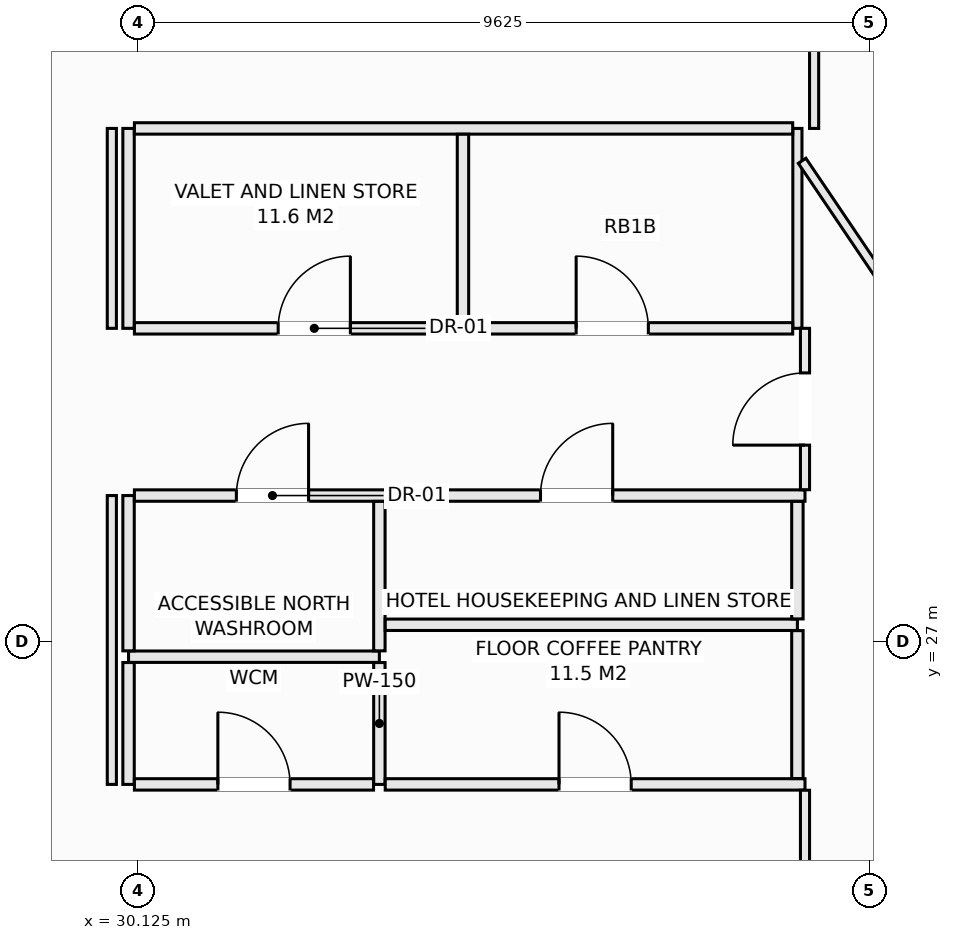
"""IFC4 building model, lengths in metres.
Left out: names, types, materials, properties, quantities, classifications, styles, units other than length and angle.
Written with IfcOpenShell. Run it as: python <this file> out.ifc"""

import sys

from ifc_helpers import new_model, si_unit, direction, frame, frame_2d, origin, place, context, subcontext, project, spatial, rectangle, extrude, element, fill, save


model = new_model("IFC4")
c1 = context("Model", 3, precision=1e-05, world=origin(), true_north=direction((0.0, 1.0)))
c2 = subcontext(c1, "Body", "Model", "MODEL_VIEW")
j1 = project(units=[si_unit("LENGTHUNIT", "METRE"), si_unit("PLANEANGLEUNIT", "RADIAN")], contexts=[c1])
p1 = place(None, origin())
s1 = spatial("IfcSite", under=j1, at=p1, CompositionType="ELEMENT")
p2 = place(p1, origin())
s2 = spatial("IfcBuilding", under=s1, at=p2, CompositionType="ELEMENT")
p3 = place(p2, frame((0.0, 0.0, 125.7)))
s3 = spatial("IfcBuildingStorey", under=s2, at=p3, CompositionType="ELEMENT", Elevation=125.7)
p4 = place(p3, frame((30.0, 26.8, 0.0), z_axis=(0.0, 0.0, 1.0), x_axis=(1.0, 0.0, 0.0)))
e1 = element("IfcWall", 1, at=p4, inside=s3, PredefinedType="PARTITIONING", context=c2, shape_type="SweptSolid", body=[
    extrude(rectangle(XDim=3.3, YDim=0.15, at=frame_2d((1.65, 0.0))), origin(), (0.0, 0.0, 1.0), 3.13),
])
p5 = place(p3, frame((30.0, 25.12, 0.0), z_axis=(0.0, 0.0, 1.0), x_axis=(0.0, 1.0, 0.0)))
e2 = element("IfcWall", 2, at=p5, inside=s3, PredefinedType="PARTITIONING", context=c2, shape_type="SweptSolid", body=[
    extrude(rectangle(XDim=1.603, YDim=0.15, at=frame_2d((0.801, 0.0))), origin(), (0.0, 0.0, 1.0), 3.13),
])
p6 = place(p3, frame((30.0, 26.877, 0.0), z_axis=(0.0, 0.0, 1.0), x_axis=(0.0, 1.0, 0.0)))
e3 = element("IfcWall", 3, at=p6, inside=s3, PredefinedType="PARTITIONING", context=c2, shape_type="SweptSolid", body=[
    extrude(rectangle(XDim=2.043, YDim=0.15, at=frame_2d((1.021, 0.0))), origin(), (0.0, 0.0, 1.0), 3.13),
])
p7 = place(p3, frame((30.0, 31.12, 0.0), z_axis=(0.0, 0.0, 1.0), x_axis=(0.0, 1.0, 0.0)))
e4 = element("IfcWall", 4, at=p7, inside=s3, PredefinedType="PARTITIONING", context=c2, shape_type="SweptSolid", body=[
    extrude(rectangle(XDim=2.63, YDim=0.15, at=frame_2d((1.315, 0.0))), origin(), (0.0, 0.0, 1.0), 3.13),
])
p8 = place(p3, frame((30.077, 28.92, 0.0), z_axis=(0.0, 0.0, 1.0), x_axis=(1.0, 0.0, 0.0)))
e5 = element("IfcWall", 5, at=p8, inside=s3, PredefinedType="PARTITIONING", context=c2, shape_type="SweptSolid", body=[
    extrude(rectangle(XDim=8.823, YDim=0.15, at=frame_2d((4.412, 0.0))), origin(), (0.0, 0.0, 1.0), 3.13),
])
p9 = place(p8, frame((1.342, 0.0, 0.0)))
e6 = element("IfcOpeningElement", 6, at=p9, cuts=e5, PredefinedType="OPENING", context=c2, shape_type="SweptSolid", body=[
    extrude(rectangle(XDim=0.95, YDim=2.1, at=frame_2d((0.475, 1.05))), frame((0.0, 0.085, 0.0), z_axis=(0.0, -1.0, 0.0), x_axis=(1.0, 0.0, 0.0)), (0.0, 0.0, 1.0), 0.17),
])
p10 = place(p8, frame((5.343, 0.0, 0.0)))
e7 = element("IfcOpeningElement", 7, at=p10, cuts=e5, PredefinedType="OPENING", context=c2, shape_type="SweptSolid", body=[
    extrude(rectangle(XDim=0.95, YDim=2.1, at=frame_2d((0.475, 1.05))), frame((0.0, 0.085, 0.0), z_axis=(0.0, -1.0, 0.0), x_axis=(1.0, 0.0, 0.0)), (0.0, 0.0, 1.0), 0.17),
])
p11 = place(p3, frame((33.3, 25.12, 0.0), z_axis=(0.0, 0.0, 1.0), x_axis=(0.0, 1.0, 0.0)))
e8 = element("IfcWall", 8, at=p11, inside=s3, PredefinedType="PARTITIONING", context=c2, shape_type="SweptSolid", body=[
    extrude(rectangle(XDim=1.603, YDim=0.15, at=frame_2d((0.801, 0.0))), origin(), (0.0, 0.0, 1.0), 3.13),
])
p12 = place(p3, frame((33.3, 26.877, 0.0), z_axis=(0.0, 0.0, 1.0), x_axis=(0.0, 1.0, 0.0)))
e9 = element("IfcWall", 9, at=p12, inside=s3, PredefinedType="PARTITIONING", context=c2, shape_type="SweptSolid", body=[
    extrude(rectangle(XDim=1.966, YDim=0.15, at=frame_2d((0.983, 0.0))), origin(), (0.0, 0.0, 1.0), 3.13),
])
p13 = place(p3, frame((30.077, 25.12, 0.0), z_axis=(0.0, 0.0, 1.0), x_axis=(1.0, 0.0, 0.0)))
e10 = element("IfcWall", 10, at=p13, inside=s3, PredefinedType="PARTITIONING", context=c2, shape_type="SweptSolid", body=[
    extrude(rectangle(XDim=3.146, YDim=0.15, at=frame_2d((1.573, 0.0))), origin(), (0.0, 0.0, 1.0), 3.13),
])
p14 = place(p13, frame((1.098, 0.0, 0.0)))
e11 = element("IfcOpeningElement", 11, at=p14, cuts=e10, PredefinedType="OPENING", context=c2, shape_type="SweptSolid", body=[
    extrude(rectangle(XDim=0.95, YDim=2.1, at=frame_2d((0.475, 1.05))), frame((0.0, 0.085, 0.0), z_axis=(0.0, -1.0, 0.0), x_axis=(1.0, 0.0, 0.0)), (0.0, 0.0, 1.0), 0.17),
])
p15 = place(p3, frame((33.377, 25.12, 0.0), z_axis=(0.0, 0.0, 1.0), x_axis=(1.0, 0.0, 0.0)))
e12 = element("IfcWall", 12, at=p15, inside=s3, PredefinedType="PARTITIONING", context=c2, shape_type="SweptSolid", body=[
    extrude(rectangle(XDim=5.523, YDim=0.15, at=frame_2d((2.761, 0.0))), origin(), (0.0, 0.0, 1.0), 3.13),
])
p16 = place(p15, frame((2.287, 0.0, 0.0)))
e13 = element("IfcOpeningElement", 13, at=p16, cuts=e12, PredefinedType="OPENING", context=c2, shape_type="SweptSolid", body=[
    extrude(rectangle(XDim=0.95, YDim=2.1, at=frame_2d((0.475, 1.05))), frame((0.0, 0.085, 0.0), z_axis=(0.0, -1.0, 0.0), x_axis=(1.0, 0.0, 0.0)), (0.0, 0.0, 1.0), 0.17),
])
p17 = place(p3, frame((33.377, 27.22, 0.0), z_axis=(0.0, 0.0, 1.0), x_axis=(1.0, 0.0, 0.0)))
e14 = element("IfcWall", 14, at=p17, inside=s3, PredefinedType="PARTITIONING", context=c2, shape_type="SweptSolid", body=[
    extrude(rectangle(XDim=5.423, YDim=0.15, at=frame_2d((2.711, 0.0))), origin(), (0.0, 0.0, 1.0), 3.13),
])
p18 = place(p3, frame((38.8, 25.197, 0.0), z_axis=(0.0, 0.0, 1.0), x_axis=(0.0, 1.0, 0.0)))
e15 = element("IfcWall", 15, at=p18, inside=s3, PredefinedType="PARTITIONING", context=c2, shape_type="SweptSolid", body=[
    extrude(rectangle(XDim=1.946, YDim=0.15, at=frame_2d((0.973, 0.0))), origin(), (0.0, 0.0, 1.0), 3.13),
])
p19 = place(p3, frame((38.8, 27.297, 0.0), z_axis=(0.0, 0.0, 1.0), x_axis=(0.0, 1.0, 0.0)))
e16 = element("IfcWall", 16, at=p19, inside=s3, PredefinedType="PARTITIONING", context=c2, shape_type="SweptSolid", body=[
    extrude(rectangle(XDim=1.546, YDim=0.15, at=frame_2d((0.773, 0.0))), origin(), (0.0, 0.0, 1.0), 3.13),
])
p20 = place(p3, frame((38.8, 31.12, 0.0), z_axis=(0.0, 0.0, 1.0), x_axis=(0.0, 1.0, 0.0)))
e17 = element("IfcWall", 17, at=p20, inside=s3, PredefinedType="PARTITIONING", context=c2, shape_type="SweptSolid", body=[
    extrude(rectangle(XDim=2.63, YDim=0.12, at=frame_2d((1.315, 0.0))), origin(), (0.0, 0.0, 1.0), 3.13),
])
p21 = place(p3, frame((30.077, 31.12, 0.0), z_axis=(0.0, 0.0, 1.0), x_axis=(1.0, 0.0, 0.0)))
e18 = element("IfcWall", 18, at=p21, inside=s3, PredefinedType="PARTITIONING", context=c2, shape_type="SweptSolid", body=[
    extrude(rectangle(XDim=8.661, YDim=0.15, at=frame_2d((4.331, 0.0))), origin(), (0.0, 0.0, 1.0), 3.13),
])
p22 = place(p21, frame((1.892, 0.0, 0.0)))
e19 = element("IfcOpeningElement", 19, at=p22, cuts=e18, PredefinedType="OPENING", context=c2, shape_type="SweptSolid", body=[
    extrude(rectangle(XDim=0.95, YDim=2.1, at=frame_2d((0.475, 1.05))), frame((0.0, 0.085, 0.0), z_axis=(0.0, -1.0, 0.0), x_axis=(1.0, 0.0, 0.0)), (0.0, 0.0, 1.0), 0.17),
])
p23 = place(p21, frame((5.812, 0.0, 0.0)))
e20 = element("IfcOpeningElement", 20, at=p23, cuts=e18, PredefinedType="OPENING", context=c2, shape_type="SweptSolid", body=[
    extrude(rectangle(XDim=0.95, YDim=2.1, at=frame_2d((0.475, 1.05))), frame((0.0, 0.085, 0.0), z_axis=(0.0, -1.0, 0.0), x_axis=(1.0, 0.0, 0.0)), (0.0, 0.0, 1.0), 0.17),
])
p24 = place(p3, frame((30.077, 33.75, 0.0), z_axis=(0.0, 0.0, 1.0), x_axis=(1.0, 0.0, 0.0)))
e21 = element("IfcWall", 21, at=p24, inside=s3, PredefinedType="PARTITIONING", context=c2, shape_type="SweptSolid", body=[
    extrude(rectangle(XDim=8.661, YDim=0.15, at=frame_2d((4.331, 0.0))), origin(), (0.0, 0.0, 1.0), 3.13),
])
p25 = place(p3, frame((34.4, 31.197, 0.0), z_axis=(0.0, 0.0, 1.0), x_axis=(0.0, 1.0, 0.0)))
e22 = element("IfcWall", 22, at=p25, inside=s3, PredefinedType="PARTITIONING", context=c2, shape_type="SweptSolid", body=[
    extrude(rectangle(XDim=2.476, YDim=0.15, at=frame_2d((1.238, 0.0))), origin(), (0.0, 0.0, 1.0), 3.13),
])
p26 = place(p3, frame((39.02, 33.75, 0.0), z_axis=(0.0, 0.0, 1.0), x_axis=(0.0, 1.0, 0.0)))
e23 = element("IfcWall", 23, at=p26, inside=s3, PredefinedType="PARTITIONING", context=c2, shape_type="SweptSolid", body=[
    extrude(rectangle(XDim=2.0, YDim=0.12, at=frame_2d((1.0, 0.0))), origin(), (0.0, 0.0, 1.0), 3.13),
])
p27 = place(p3, frame((29.78, 25.12, 0.0), z_axis=(0.0, 0.0, 1.0), x_axis=(0.0, 1.0, 0.0)))
e24 = element("IfcWall", 24, at=p27, inside=s3, PredefinedType="PARTITIONING", context=c2, shape_type="SweptSolid", body=[
    extrude(rectangle(XDim=3.8, YDim=0.12, at=frame_2d((1.9, 0.0))), origin(), (0.0, 0.0, 1.0), 3.13),
])
p28 = place(p3, frame((29.78, 31.12, 0.0), z_axis=(0.0, 0.0, 1.0), x_axis=(0.0, 1.0, 0.0)))
e25 = element("IfcWall", 25, at=p28, inside=s3, PredefinedType="PARTITIONING", context=c2, shape_type="SweptSolid", body=[
    extrude(rectangle(XDim=2.63, YDim=0.12, at=frame_2d((1.315, 0.0))), origin(), (0.0, 0.0, 1.0), 3.13),
])
p29 = place(p3, frame((38.9, 23.02, 0.0), z_axis=(0.0, 0.0, 1.0), x_axis=(0.0, 1.0, 0.0)))
e26 = element("IfcWall", 26, at=p29, inside=s3, PredefinedType="PARTITIONING", context=c2, shape_type="SweptSolid", body=[
    extrude(rectangle(XDim=2.023, YDim=0.12, at=frame_2d((1.011, 0.0))), origin(), (0.0, 0.0, 1.0), 3.13),
])
p30 = place(p3, frame((38.9, 28.997, 0.0), z_axis=(0.0, 0.0, 1.0), x_axis=(0.0, 1.0, 0.0)))
e27 = element("IfcWall", 27, at=p30, inside=s3, PredefinedType="PARTITIONING", context=c2, shape_type="SweptSolid", body=[
    extrude(rectangle(XDim=2.123, YDim=0.12, at=frame_2d((1.062, 0.0))), origin(), (0.0, 0.0, 1.0), 3.13),
])
p31 = place(p30, frame((0.586, 0.0, 0.0)))
e28 = element("IfcOpeningElement", 28, at=p31, cuts=e27, PredefinedType="OPENING", context=c2, shape_type="SweptSolid", body=[
    extrude(rectangle(XDim=0.95, YDim=2.1, at=frame_2d((0.475, 1.05))), frame((0.0, 0.07, 0.0), z_axis=(0.0, -1.0, 0.0), x_axis=(1.0, 0.0, 0.0)), (0.0, 0.0, 1.0), 0.14),
])
p32 = place(p3, frame((38.862, 33.324, 0.0), z_axis=(0.0, 0.0, 1.0), x_axis=(0.55994174094, -0.828531982939, 0.0)))
e29 = element("IfcWall", 29, at=p32, inside=s3, PredefinedType="PARTITIONING", context=c2, shape_type="SweptSolid", body=[
    extrude(rectangle(XDim=19.768, YDim=0.12, at=frame_2d((9.884, 0.0))), origin(), (0.0, 0.0, 1.0), 2.505),
])
p33 = place(p3, frame((36.368, 40.488, 0.0), z_axis=(0.0, 0.0, 1.0), x_axis=(0.604016753865, -0.796971618723, 0.0)))
e30 = element("IfcWall", 30, at=p33, inside=s3, PredefinedType="PARTITIONING", context=c2, shape_type="SweptSolid", body=[
    extrude(rectangle(XDim=26.091, YDim=0.15, at=frame_2d((13.046, 0.0))), origin(), (0.0, 0.0, 1.0), 3.13),
])
p34 = place(p9, origin())
e31 = element("IfcDoor", 31, at=p34, inside=s3, OperationType="SINGLE_SWING_RIGHT", PredefinedType="DOOR", context=c2, shape_type="SweptSolid", body=[
    extrude(rectangle(XDim=0.95, YDim=2.1, at=frame_2d((0.475, 1.05))), frame((0.0, 0.025, 0.0), z_axis=(0.0, -1.0, 0.0), x_axis=(1.0, 0.0, 0.0)), (0.0, 0.0, 1.0), 0.05),
])
fill(e6, e31)
p35 = place(p14, origin())
e32 = element("IfcDoor", 32, at=p35, inside=s3, OperationType="SINGLE_SWING_LEFT", PredefinedType="DOOR", context=c2, shape_type="SweptSolid", body=[
    extrude(rectangle(XDim=0.95, YDim=2.1, at=frame_2d((0.475, 1.05))), frame((0.0, 0.025, 0.0), z_axis=(0.0, -1.0, 0.0), x_axis=(1.0, 0.0, 0.0)), (0.0, 0.0, 1.0), 0.05),
])
fill(e11, e32)
p36 = place(p10, origin())
e33 = element("IfcDoor", 33, at=p36, inside=s3, OperationType="SINGLE_SWING_RIGHT", PredefinedType="DOOR", context=c2, shape_type="SweptSolid", body=[
    extrude(rectangle(XDim=0.95, YDim=2.1, at=frame_2d((0.475, 1.05))), frame((0.0, 0.025, 0.0), z_axis=(0.0, -1.0, 0.0), x_axis=(1.0, 0.0, 0.0)), (0.0, 0.0, 1.0), 0.05),
])
fill(e7, e33)
p37 = place(p16, origin())
e34 = element("IfcDoor", 34, at=p37, inside=s3, OperationType="SINGLE_SWING_LEFT", PredefinedType="DOOR", context=c2, shape_type="SweptSolid", body=[
    extrude(rectangle(XDim=0.95, YDim=2.1, at=frame_2d((0.475, 1.05))), frame((0.0, 0.025, 0.0), z_axis=(0.0, -1.0, 0.0), x_axis=(1.0, 0.0, 0.0)), (0.0, 0.0, 1.0), 0.05),
])
fill(e13, e34)
p38 = place(p22, origin())
e35 = element("IfcDoor", 35, at=p38, inside=s3, OperationType="SINGLE_SWING_RIGHT", PredefinedType="DOOR", context=c2, shape_type="SweptSolid", body=[
    extrude(rectangle(XDim=0.95, YDim=2.1, at=frame_2d((0.475, 1.05))), frame((0.0, 0.025, 0.0), z_axis=(0.0, -1.0, 0.0), x_axis=(1.0, 0.0, 0.0)), (0.0, 0.0, 1.0), 0.05),
])
fill(e19, e35)
p39 = place(p23, origin())
e36 = element("IfcDoor", 36, at=p39, inside=s3, OperationType="SINGLE_SWING_LEFT", PredefinedType="DOOR", context=c2, shape_type="SweptSolid", body=[
    extrude(rectangle(XDim=0.95, YDim=2.1, at=frame_2d((0.475, 1.05))), frame((0.0, 0.025, 0.0), z_axis=(0.0, -1.0, 0.0), x_axis=(1.0, 0.0, 0.0)), (0.0, 0.0, 1.0), 0.05),
])
fill(e20, e36)
p40 = place(p31, origin())
e37 = element("IfcDoor", 37, at=p40, inside=s3, OperationType="SINGLE_SWING_LEFT", PredefinedType="DOOR", context=c2, shape_type="SweptSolid", body=[
    extrude(rectangle(XDim=0.95, YDim=2.1, at=frame_2d((0.475, 1.05))), frame((0.0, 0.025, 0.0), z_axis=(0.0, -1.0, 0.0), x_axis=(1.0, 0.0, 0.0)), (0.0, 0.0, 1.0), 0.05),
])
fill(e28, e37)
save(model, sys.argv[1])
